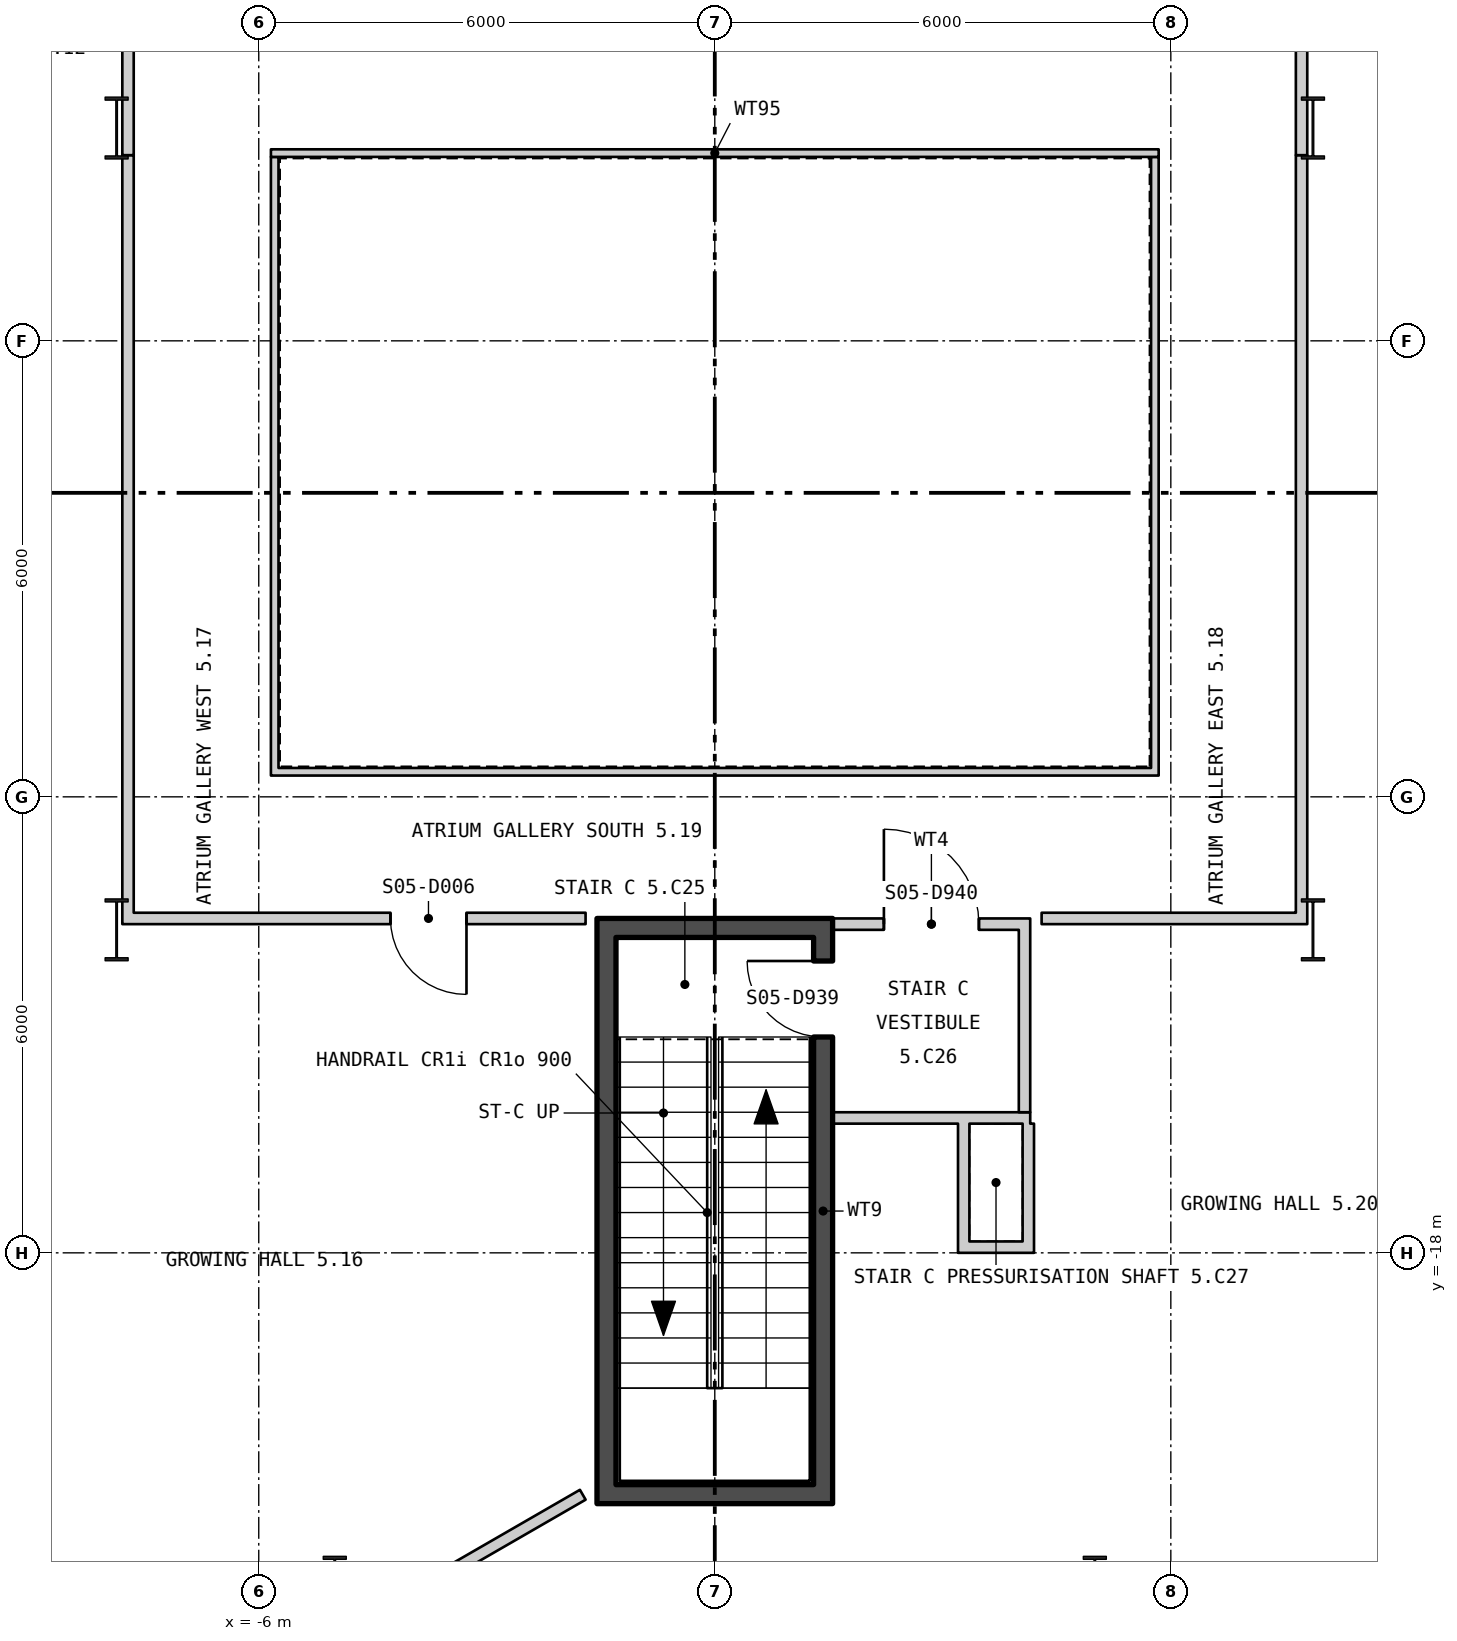
"""IFC4 building model, lengths in metres.
Left out: names, types, materials, properties, quantities, classifications, styles, units other than length and angle.
Written with IfcOpenShell. Run it as: python <this file> out.ifc"""

import sys

from ifc_helpers import new_model, si_unit, direction, frame, frame_2d, origin, origin_2d, place, context, subcontext, project, spatial, polyline, rectangle, i_section, outline, extrude, element, fill, save


model = new_model("IFC4")
c1 = context("Model", 3, precision=1e-05, world=origin(), true_north=direction((0.0, 1.0)))
c2 = subcontext(c1, "Body", "Model", "MODEL_VIEW")
j1 = project(units=[si_unit("LENGTHUNIT", "METRE"), si_unit("PLANEANGLEUNIT", "RADIAN")], contexts=[c1])
p1 = place(None, origin())
s1 = spatial("IfcSite", under=j1, at=p1, CompositionType="ELEMENT")
p2 = place(p1, origin())
s2 = spatial("IfcBuilding", under=s1, at=p2, CompositionType="ELEMENT")
p3 = place(p2, frame((0.0, 0.0, 69.3)))
s3 = spatial("IfcBuildingStorey", under=s2, at=p3, CompositionType="ELEMENT", Elevation=69.3)
for number, where, z_axis, x_axis in (
    (1, (7.87, -3.2, 0.0), (0.0, 0.0, 1.0), (1.0, 0.0, 0.0)),
    (2, (-7.87, -3.2, 0.0), (0.0, 0.0, 1.0), (1.0, 0.0, 0.0)),
    (3, (7.87, -13.75, 0.0), (0.0, 0.0, 1.0), (1.0, 0.0, 0.0)),
    (4, (-7.87, -13.75, 0.0), (0.0, 0.0, 1.0), (1.0, 0.0, 0.0)),
    (5, (5.0, -22.4, 0.0), (0.0, 0.0, 1.0), (1.0, 0.0, 0.0)),
    (6, (-5.0, -22.4, 0.0), (0.0, 0.0, 1.0), (1.0, 0.0, 0.0)),
):
    element("IfcColumn", number, at=place(p3, frame(where, z_axis=z_axis, x_axis=x_axis)), inside=s3, PredefinedType="COLUMN", context=c2, shape_type="SweptSolid", body=[
        extrude(i_section(OverallWidth=0.303, OverallDepth=0.814, WebThickness=0.021, FlangeThickness=0.04, at=origin_2d()), origin(), (0.0, 0.0, 1.0), 4.5),
    ])
p4 = place(p3, frame((-28.18, 10.778, -0.18), z_axis=(0.0, 0.0, 1.0), x_axis=(0.500000711659, -0.866024992908, 0.0)))
e7 = element("IfcWall", 7, at=p4, inside=s3, PredefinedType="SOLIDWALL", context=c2, shape_type="SweptSolid", body=[
    extrude(outline(polyline([(-0.13, -0.225), (45.87, -0.225), (45.61, 0.225), (0.13, 0.225), (-0.13, -0.225)])), origin(), (0.0, 0.0, 1.0), 4.28),
])
p5 = place(p4, frame((1.424, 0.0, 1.08)))
e8 = element("IfcOpeningElement", 8, at=p5, cuts=e7, PredefinedType="OPENING", context=c2, shape_type="SweptSolid", body=[
    extrude(rectangle(XDim=2.4, YDim=2.6, at=frame_2d((1.2, 1.3))), frame((0.0, 0.235, 0.0), z_axis=(0.0, -1.0, 0.0), x_axis=(1.0, 0.0, 0.0)), (0.0, 0.0, 1.0), 0.47),
])
p6 = place(p4, frame((5.893, 0.0, 1.08)))
e9 = element("IfcOpeningElement", 9, at=p6, cuts=e7, PredefinedType="OPENING", context=c2, shape_type="SweptSolid", body=[
    extrude(rectangle(XDim=2.4, YDim=2.6, at=frame_2d((1.2, 1.3))), frame((0.0, 0.235, 0.0), z_axis=(0.0, -1.0, 0.0), x_axis=(1.0, 0.0, 0.0)), (0.0, 0.0, 1.0), 0.47),
])
p7 = place(p4, frame((10.401, 0.0, 1.08)))
e10 = element("IfcOpeningElement", 10, at=p7, cuts=e7, PredefinedType="OPENING", context=c2, shape_type="SweptSolid", body=[
    extrude(rectangle(XDim=2.4, YDim=2.6, at=frame_2d((1.2, 1.3))), frame((0.0, 0.235, 0.0), z_axis=(0.0, -1.0, 0.0), x_axis=(1.0, 0.0, 0.0)), (0.0, 0.0, 1.0), 0.47),
])
p8 = place(p4, frame((14.909, 0.0, 1.08)))
e11 = element("IfcOpeningElement", 11, at=p8, cuts=e7, PredefinedType="OPENING", context=c2, shape_type="SweptSolid", body=[
    extrude(rectangle(XDim=2.4, YDim=2.6, at=frame_2d((1.2, 1.3))), frame((0.0, 0.235, 0.0), z_axis=(0.0, -1.0, 0.0), x_axis=(1.0, 0.0, 0.0)), (0.0, 0.0, 1.0), 0.47),
])
p9 = place(p4, frame((19.416, 0.0, 1.08)))
e12 = element("IfcOpeningElement", 12, at=p9, cuts=e7, PredefinedType="OPENING", context=c2, shape_type="SweptSolid", body=[
    extrude(rectangle(XDim=2.4, YDim=2.6, at=frame_2d((1.2, 1.3))), frame((0.0, 0.235, 0.0), z_axis=(0.0, -1.0, 0.0), x_axis=(1.0, 0.0, 0.0)), (0.0, 0.0, 1.0), 0.47),
])
p10 = place(p4, frame((23.924, 0.0, 1.08)))
e13 = element("IfcOpeningElement", 13, at=p10, cuts=e7, PredefinedType="OPENING", context=c2, shape_type="SweptSolid", body=[
    extrude(rectangle(XDim=2.4, YDim=2.6, at=frame_2d((1.2, 1.3))), frame((0.0, 0.235, 0.0), z_axis=(0.0, -1.0, 0.0), x_axis=(1.0, 0.0, 0.0)), (0.0, 0.0, 1.0), 0.47),
])
p11 = place(p4, frame((28.431, 0.0, 1.08)))
e14 = element("IfcOpeningElement", 14, at=p11, cuts=e7, PredefinedType="OPENING", context=c2, shape_type="SweptSolid", body=[
    extrude(rectangle(XDim=2.4, YDim=2.6, at=frame_2d((1.2, 1.3))), frame((0.0, 0.235, 0.0), z_axis=(0.0, -1.0, 0.0), x_axis=(1.0, 0.0, 0.0)), (0.0, 0.0, 1.0), 0.47),
])
p12 = place(p4, frame((32.939, 0.0, 1.08)))
e15 = element("IfcOpeningElement", 15, at=p12, cuts=e7, PredefinedType="OPENING", context=c2, shape_type="SweptSolid", body=[
    extrude(rectangle(XDim=2.4, YDim=2.6, at=frame_2d((1.2, 1.3))), frame((0.0, 0.235, 0.0), z_axis=(0.0, -1.0, 0.0), x_axis=(1.0, 0.0, 0.0)), (0.0, 0.0, 1.0), 0.47),
])
p13 = place(p4, frame((37.447, 0.0, 1.08)))
e16 = element("IfcOpeningElement", 16, at=p13, cuts=e7, PredefinedType="OPENING", context=c2, shape_type="SweptSolid", body=[
    extrude(rectangle(XDim=2.4, YDim=2.6, at=frame_2d((1.2, 1.3))), frame((0.0, 0.235, 0.0), z_axis=(0.0, -1.0, 0.0), x_axis=(1.0, 0.0, 0.0)), (0.0, 0.0, 1.0), 0.47),
])
p14 = place(p4, frame((41.916, 0.0, 1.08)))
e17 = element("IfcOpeningElement", 17, at=p14, cuts=e7, PredefinedType="OPENING", context=c2, shape_type="SweptSolid", body=[
    extrude(rectangle(XDim=2.4, YDim=2.6, at=frame_2d((1.2, 1.3))), frame((0.0, 0.235, 0.0), z_axis=(0.0, -1.0, 0.0), x_axis=(1.0, 0.0, 0.0)), (0.0, 0.0, 1.0), 0.47),
])
p15 = place(p3, frame((5.31, -28.834, -0.18), z_axis=(0.0, 0.0, 1.0), x_axis=(0.500000711659, 0.866024992908, 0.0)))
e18 = element("IfcWall", 18, at=p15, inside=s3, PredefinedType="SOLIDWALL", context=c2, shape_type="SweptSolid", body=[
    extrude(outline(polyline([(-0.13, -0.225), (45.87, -0.225), (45.61, 0.225), (0.13, 0.225), (-0.13, -0.225)])), origin(), (0.0, 0.0, 1.0), 4.28),
])
p16 = place(p15, frame((1.424, 0.0, 1.08)))
e19 = element("IfcOpeningElement", 19, at=p16, cuts=e18, PredefinedType="OPENING", context=c2, shape_type="SweptSolid", body=[
    extrude(rectangle(XDim=2.4, YDim=2.6, at=frame_2d((1.2, 1.3))), frame((0.0, 0.235, 0.0), z_axis=(0.0, -1.0, 0.0), x_axis=(1.0, 0.0, 0.0)), (0.0, 0.0, 1.0), 0.47),
])
p17 = place(p15, frame((5.893, 0.0, 1.08)))
e20 = element("IfcOpeningElement", 20, at=p17, cuts=e18, PredefinedType="OPENING", context=c2, shape_type="SweptSolid", body=[
    extrude(rectangle(XDim=2.4, YDim=2.6, at=frame_2d((1.2, 1.3))), frame((0.0, 0.235, 0.0), z_axis=(0.0, -1.0, 0.0), x_axis=(1.0, 0.0, 0.0)), (0.0, 0.0, 1.0), 0.47),
])
p18 = place(p15, frame((10.401, 0.0, 1.08)))
e21 = element("IfcOpeningElement", 21, at=p18, cuts=e18, PredefinedType="OPENING", context=c2, shape_type="SweptSolid", body=[
    extrude(rectangle(XDim=2.4, YDim=2.6, at=frame_2d((1.2, 1.3))), frame((0.0, 0.235, 0.0), z_axis=(0.0, -1.0, 0.0), x_axis=(1.0, 0.0, 0.0)), (0.0, 0.0, 1.0), 0.47),
])
p19 = place(p15, frame((14.909, 0.0, 1.08)))
e22 = element("IfcOpeningElement", 22, at=p19, cuts=e18, PredefinedType="OPENING", context=c2, shape_type="SweptSolid", body=[
    extrude(rectangle(XDim=2.4, YDim=2.6, at=frame_2d((1.2, 1.3))), frame((0.0, 0.235, 0.0), z_axis=(0.0, -1.0, 0.0), x_axis=(1.0, 0.0, 0.0)), (0.0, 0.0, 1.0), 0.47),
])
p20 = place(p15, frame((19.416, 0.0, 1.08)))
e23 = element("IfcOpeningElement", 23, at=p20, cuts=e18, PredefinedType="OPENING", context=c2, shape_type="SweptSolid", body=[
    extrude(rectangle(XDim=2.4, YDim=2.6, at=frame_2d((1.2, 1.3))), frame((0.0, 0.235, 0.0), z_axis=(0.0, -1.0, 0.0), x_axis=(1.0, 0.0, 0.0)), (0.0, 0.0, 1.0), 0.47),
])
p21 = place(p15, frame((23.924, 0.0, 1.08)))
e24 = element("IfcOpeningElement", 24, at=p21, cuts=e18, PredefinedType="OPENING", context=c2, shape_type="SweptSolid", body=[
    extrude(rectangle(XDim=2.4, YDim=2.6, at=frame_2d((1.2, 1.3))), frame((0.0, 0.235, 0.0), z_axis=(0.0, -1.0, 0.0), x_axis=(1.0, 0.0, 0.0)), (0.0, 0.0, 1.0), 0.47),
])
p22 = place(p15, frame((28.431, 0.0, 1.08)))
e25 = element("IfcOpeningElement", 25, at=p22, cuts=e18, PredefinedType="OPENING", context=c2, shape_type="SweptSolid", body=[
    extrude(rectangle(XDim=2.4, YDim=2.6, at=frame_2d((1.2, 1.3))), frame((0.0, 0.235, 0.0), z_axis=(0.0, -1.0, 0.0), x_axis=(1.0, 0.0, 0.0)), (0.0, 0.0, 1.0), 0.47),
])
p23 = place(p15, frame((37.447, 0.0, 1.08)))
e26 = element("IfcOpeningElement", 26, at=p23, cuts=e18, PredefinedType="OPENING", context=c2, shape_type="SweptSolid", body=[
    extrude(rectangle(XDim=2.4, YDim=2.6, at=frame_2d((1.2, 1.3))), frame((0.0, 0.235, 0.0), z_axis=(0.0, -1.0, 0.0), x_axis=(1.0, 0.0, 0.0)), (0.0, 0.0, 1.0), 0.47),
])
p24 = place(p15, frame((41.916, 0.0, 1.08)))
e27 = element("IfcOpeningElement", 27, at=p24, cuts=e18, PredefinedType="OPENING", context=c2, shape_type="SweptSolid", body=[
    extrude(rectangle(XDim=2.4, YDim=2.6, at=frame_2d((1.2, 1.3))), frame((0.0, 0.235, 0.0), z_axis=(0.0, -1.0, 0.0), x_axis=(1.0, 0.0, 0.0)), (0.0, 0.0, 1.0), 0.47),
])
p25 = place(p3, frame((-5.84, -11.67, 0.0), z_axis=(0.0, 0.0, 1.0), x_axis=(1.0, 0.0, 0.0)))
e28 = element("IfcWall", 28, at=p25, inside=s3, PredefinedType="PARTITIONING", context=c2, shape_type="SweptSolid", body=[
    extrude(rectangle(XDim=11.68, YDim=0.1, at=frame_2d((5.84, 0.0))), origin(), (0.0, 0.0, 1.0), 4.3),
])
p26 = place(p3, frame((5.79, -11.62, 0.0), z_axis=(0.0, 0.0, 1.0), x_axis=(0.0, 1.0, 0.0)))
e29 = element("IfcWall", 29, at=p26, inside=s3, PredefinedType="PARTITIONING", context=c2, shape_type="SweptSolid", body=[
    extrude(rectangle(XDim=8.04, YDim=0.1, at=frame_2d((4.02, 0.0))), origin(), (0.0, 0.0, 1.0), 4.3),
])
p27 = place(p3, frame((5.84, -3.53, 0.0), z_axis=(0.0, 0.0, 1.0), x_axis=(-1.0, 0.0, 0.0)))
e30 = element("IfcWall", 30, at=p27, inside=s3, PredefinedType="PARTITIONING", context=c2, shape_type="SweptSolid", body=[
    extrude(rectangle(XDim=11.68, YDim=0.1, at=frame_2d((5.84, 0.0))), origin(), (0.0, 0.0, 1.0), 4.3),
])
p28 = place(p3, frame((-5.79, -3.58, 0.0), z_axis=(0.0, 0.0, 1.0), x_axis=(0.0, -1.0, 0.0)))
e31 = element("IfcWall", 31, at=p28, inside=s3, PredefinedType="PARTITIONING", context=c2, shape_type="SweptSolid", body=[
    extrude(rectangle(XDim=8.04, YDim=0.1, at=frame_2d((4.02, 0.0))), origin(), (0.0, 0.0, 1.0), 4.3),
])
p29 = place(p3, frame((-1.425, -21.05, 0.0), z_axis=(0.0, 0.0, 1.0), x_axis=(0.0, 1.0, 0.0)))
e32 = element("IfcWall", 32, at=p29, inside=s3, PredefinedType="SHEAR", context=c2, shape_type="SweptSolid", body=[
    extrude(rectangle(XDim=7.2, YDim=0.25, at=frame_2d((3.6, 0.0))), origin(), (0.0, 0.0, 1.0), 4.3),
])
p30 = place(p3, frame((1.425, -21.05, 0.0), z_axis=(0.0, 0.0, 1.0), x_axis=(0.0, 1.0, 0.0)))
e33 = element("IfcWall", 33, at=p30, inside=s3, PredefinedType="SHEAR", context=c2, shape_type="SweptSolid", body=[
    extrude(rectangle(XDim=7.2, YDim=0.25, at=frame_2d((3.6, 0.0))), origin(), (0.0, 0.0, 1.0), 4.3),
])
p31 = place(p30, frame((5.89, 0.0, 0.0)))
e34 = element("IfcOpeningElement", 34, at=p31, cuts=e33, PredefinedType="OPENING", context=c2, shape_type="SweptSolid", body=[
    extrude(rectangle(XDim=1.0, YDim=2.1, at=frame_2d((0.5, 1.05))), frame((0.0, 0.135, 0.0), z_axis=(0.0, -1.0, 0.0), x_axis=(1.0, 0.0, 0.0)), (0.0, 0.0, 1.0), 0.27),
])
for number, where, z_axis, x_axis in (
    (35, (-1.55, -21.175, 0.0), (0.0, 0.0, 1.0), (1.0, 0.0, 0.0)),
    (36, (-1.55, -13.725, 0.0), (0.0, 0.0, 1.0), (1.0, 0.0, 0.0)),
):
    element("IfcWall", number, at=place(p3, frame(where, z_axis=z_axis, x_axis=x_axis)), inside=s3, PredefinedType="SHEAR", context=c2, shape_type="SweptSolid", body=[
        extrude(rectangle(XDim=3.1, YDim=0.25, at=frame_2d((1.55, 0.0))), origin(), (0.0, 0.0, 1.0), 4.3),
    ])
p32 = place(p3, frame((1.55, -16.225, 0.0), z_axis=(0.0, 0.0, 1.0), x_axis=(1.0, 0.0, 0.0)))
e37 = element("IfcWall", 37, at=p32, inside=s3, PredefinedType="PARTITIONING", context=c2, shape_type="SweptSolid", body=[
    extrude(rectangle(XDim=2.6, YDim=0.15, at=frame_2d((1.3, 0.0))), origin(), (0.0, 0.0, 1.0), 4.3),
])
p33 = place(p3, frame((4.075, -16.15, 0.0), z_axis=(0.0, 0.0, 1.0), x_axis=(0.0, 1.0, 0.0)))
e38 = element("IfcWall", 38, at=p33, inside=s3, PredefinedType="PARTITIONING", context=c2, shape_type="SweptSolid", body=[
    extrude(rectangle(XDim=2.4, YDim=0.15, at=frame_2d((1.2, 0.0))), origin(), (0.0, 0.0, 1.0), 4.3),
])
p34 = place(p3, frame((1.55, -13.675, 0.0), z_axis=(0.0, 0.0, 1.0), x_axis=(1.0, 0.0, 0.0)))
e39 = element("IfcWall", 39, at=p34, inside=s3, PredefinedType="PARTITIONING", context=c2, shape_type="SweptSolid", body=[
    extrude(rectangle(XDim=2.6, YDim=0.15, at=frame_2d((1.3, 0.0))), origin(), (0.0, 0.0, 1.0), 3.39),
])
p35 = place(p34, frame((0.675, 0.0, 0.0)))
e40 = element("IfcOpeningElement", 40, at=p35, cuts=e39, PredefinedType="OPENING", context=c2, shape_type="SweptSolid", body=[
    extrude(rectangle(XDim=1.25, YDim=2.1, at=frame_2d((0.625, 1.05))), frame((0.0, 0.085, 0.0), z_axis=(0.0, -1.0, 0.0), x_axis=(1.0, 0.0, 0.0)), (0.0, 0.0, 1.0), 0.17),
])
p36 = place(p3, frame((3.275, -18.0, 0.0), z_axis=(0.0, 0.0, 1.0), x_axis=(0.0, 1.0, 0.0)))
e41 = element("IfcWall", 41, at=p36, inside=s3, PredefinedType="PARTITIONING", context=c2, shape_type="SweptSolid", body=[
    extrude(rectangle(XDim=1.7, YDim=0.15, at=frame_2d((0.85, 0.0))), origin(), (0.0, 0.0, 1.0), 3.7),
])
p37 = place(p3, frame((3.35, -17.925, 0.0), z_axis=(0.0, 0.0, 1.0), x_axis=(1.0, 0.0, 0.0)))
e42 = element("IfcWall", 42, at=p37, inside=s3, PredefinedType="PARTITIONING", context=c2, shape_type="SweptSolid", body=[
    extrude(rectangle(XDim=0.7, YDim=0.15, at=frame_2d((0.35, 0.0))), origin(), (0.0, 0.0, 1.0), 4.3),
])
p38 = place(p3, frame((4.125, -18.0, 0.0), z_axis=(0.0, 0.0, 1.0), x_axis=(0.0, 1.0, 0.0)))
e43 = element("IfcWall", 43, at=p38, inside=s3, PredefinedType="PARTITIONING", context=c2, shape_type="SweptSolid", body=[
    extrude(rectangle(XDim=1.7, YDim=0.15, at=frame_2d((0.85, 0.0))), origin(), (0.0, 0.0, 1.0), 4.3),
])
p39 = place(p3, frame((-7.72, -13.675, 0.0), z_axis=(0.0, 0.0, 1.0), x_axis=(0.0, 1.0, 0.0)))
e44 = element("IfcWall", 44, at=p39, inside=s3, PredefinedType="PARTITIONING", context=c2, shape_type="SweptSolid", body=[
    extrude(rectangle(XDim=10.118, YDim=0.15, at=frame_2d((5.059, 0.0))), origin(), (0.0, 0.0, 1.0), 3.61),
])
p40 = place(p3, frame((-7.72, -3.557, 0.0), z_axis=(0.0, 0.0, 1.0), x_axis=(0.0, 1.0, 0.0)))
e45 = element("IfcWall", 45, at=p40, inside=s3, PredefinedType="PARTITIONING", context=c2, shape_type="SweptSolid", body=[
    extrude(rectangle(XDim=3.557, YDim=0.15, at=frame_2d((1.778, 0.0))), origin(), (0.0, 0.0, 1.0), 4.3),
])
p41 = place(p40, frame((2.157, 0.0, 0.0)))
e46 = element("IfcOpeningElement", 46, at=p41, cuts=e45, PredefinedType="OPENING", context=c2, shape_type="SweptSolid", body=[
    extrude(rectangle(XDim=1.0, YDim=2.1, at=frame_2d((0.5, 1.05))), frame((0.0, 0.085, 0.0), z_axis=(0.0, -1.0, 0.0), x_axis=(1.0, 0.0, 0.0)), (0.0, 0.0, 1.0), 0.17),
])
p42 = place(p3, frame((-7.645, -13.6, 0.0), z_axis=(0.0, 0.0, 1.0), x_axis=(1.0, 0.0, 0.0)))
e47 = element("IfcWall", 47, at=p42, inside=s3, PredefinedType="PARTITIONING", context=c2, shape_type="SweptSolid", body=[
    extrude(rectangle(XDim=5.945, YDim=0.15, at=frame_2d((2.973, 0.0))), origin(), (0.0, 0.0, 1.0), 3.39),
])
p43 = place(p42, frame((3.378, 0.0, 0.0)))
e48 = element("IfcOpeningElement", 48, at=p43, cuts=e47, PredefinedType="OPENING", context=c2, shape_type="SweptSolid", body=[
    extrude(rectangle(XDim=1.0, YDim=2.1, at=frame_2d((0.5, 1.05))), frame((0.0, 0.085, 0.0), z_axis=(0.0, -1.0, 0.0), x_axis=(1.0, 0.0, 0.0)), (0.0, 0.0, 1.0), 0.17),
])
p44 = place(p3, frame((-7.146, -24.304, 0.0), z_axis=(0.0, 0.0, 1.0), x_axis=(0.86615625953, 0.499773282676, 0.0)))
e49 = element("IfcWall", 49, at=p44, inside=s3, PredefinedType="PARTITIONING", context=c2, shape_type="SweptSolid", body=[
    extrude(rectangle(XDim=6.245, YDim=0.15, at=frame_2d((3.122, 0.0))), origin(), (0.0, 0.0, 1.0), 4.3),
])
p45 = place(p3, frame((4.3, -13.6, 0.0), z_axis=(0.0, 0.0, 1.0), x_axis=(1.0, 0.0, 0.0)))
e50 = element("IfcWall", 50, at=p45, inside=s3, PredefinedType="PARTITIONING", context=c2, shape_type="SweptSolid", body=[
    extrude(rectangle(XDim=3.345, YDim=0.15, at=frame_2d((1.673, 0.0))), origin(), (0.0, 0.0, 1.0), 3.39),
])
p46 = place(p3, frame((7.72, -13.675, 0.0), z_axis=(0.0, 0.0, 1.0), x_axis=(0.0, 1.0, 0.0)))
e51 = element("IfcWall", 51, at=p46, inside=s3, PredefinedType="PARTITIONING", context=c2, shape_type="SweptSolid", body=[
    extrude(rectangle(XDim=10.118, YDim=0.15, at=frame_2d((5.059, 0.0))), origin(), (0.0, 0.0, 1.0), 3.61),
])
p47 = place(p3, frame((7.72, -3.557, 0.0), z_axis=(0.0, 0.0, 1.0), x_axis=(0.0, 1.0, 0.0)))
e52 = element("IfcWall", 52, at=p47, inside=s3, PredefinedType="PARTITIONING", context=c2, shape_type="SweptSolid", body=[
    extrude(rectangle(XDim=1.768, YDim=0.15, at=frame_2d((0.884, 0.0))), origin(), (0.0, 0.0, 1.0), 4.3),
])
p48 = place(p13, origin())
e53 = element("IfcWindow", 53, at=p48, inside=s3, PartitioningType="SINGLE_PANEL", PredefinedType="WINDOW", context=c2, shape_type="SweptSolid", body=[
    extrude(rectangle(XDim=2.4, YDim=2.6, at=frame_2d((1.2, 1.3))), frame((0.0, 0.105, 0.0), z_axis=(0.0, -1.0, 0.0), x_axis=(1.0, 0.0, 0.0)), (0.0, 0.0, 1.0), 0.06),
])
fill(e16, e53)
p49 = place(p17, origin())
e54 = element("IfcWindow", 54, at=p49, inside=s3, PartitioningType="SINGLE_PANEL", PredefinedType="WINDOW", context=c2, shape_type="SweptSolid", body=[
    extrude(rectangle(XDim=2.4, YDim=2.6, at=frame_2d((1.2, 1.3))), frame((0.0, 0.105, 0.0), z_axis=(0.0, -1.0, 0.0), x_axis=(1.0, 0.0, 0.0)), (0.0, 0.0, 1.0), 0.06),
])
fill(e20, e54)
p50 = place(p31, origin())
e55 = element("IfcDoor", 55, at=p50, inside=s3, OperationType="SINGLE_SWING_LEFT", PredefinedType="DOOR", context=c2, shape_type="SweptSolid", body=[
    extrude(rectangle(XDim=1.0, YDim=2.1, at=frame_2d((0.5, 1.05))), frame((0.0, 0.025, 0.0), z_axis=(0.0, -1.0, 0.0), x_axis=(1.0, 0.0, 0.0)), (0.0, 0.0, 1.0), 0.05),
])
fill(e34, e55)
p51 = place(p35, origin())
e56 = element("IfcDoor", 56, at=p51, inside=s3, OperationType="SINGLE_SWING_RIGHT", PredefinedType="DOOR", context=c2, shape_type="SweptSolid", body=[
    extrude(rectangle(XDim=1.25, YDim=2.1, at=frame_2d((0.625, 1.05))), frame((0.0, 0.025, 0.0), z_axis=(0.0, -1.0, 0.0), x_axis=(1.0, 0.0, 0.0)), (0.0, 0.0, 1.0), 0.05),
])
fill(e40, e56)
p52 = place(p43, origin())
e57 = element("IfcDoor", 57, at=p52, inside=s3, OperationType="SINGLE_SWING_RIGHT", PredefinedType="DOOR", context=c2, shape_type="SweptSolid", body=[
    extrude(rectangle(XDim=1.0, YDim=2.1, at=frame_2d((0.5, 1.05))), frame((0.0, 0.025, 0.0), z_axis=(0.0, -1.0, 0.0), x_axis=(1.0, 0.0, 0.0)), (0.0, 0.0, 1.0), 0.05),
])
fill(e48, e57)
save(model, sys.argv[1])
